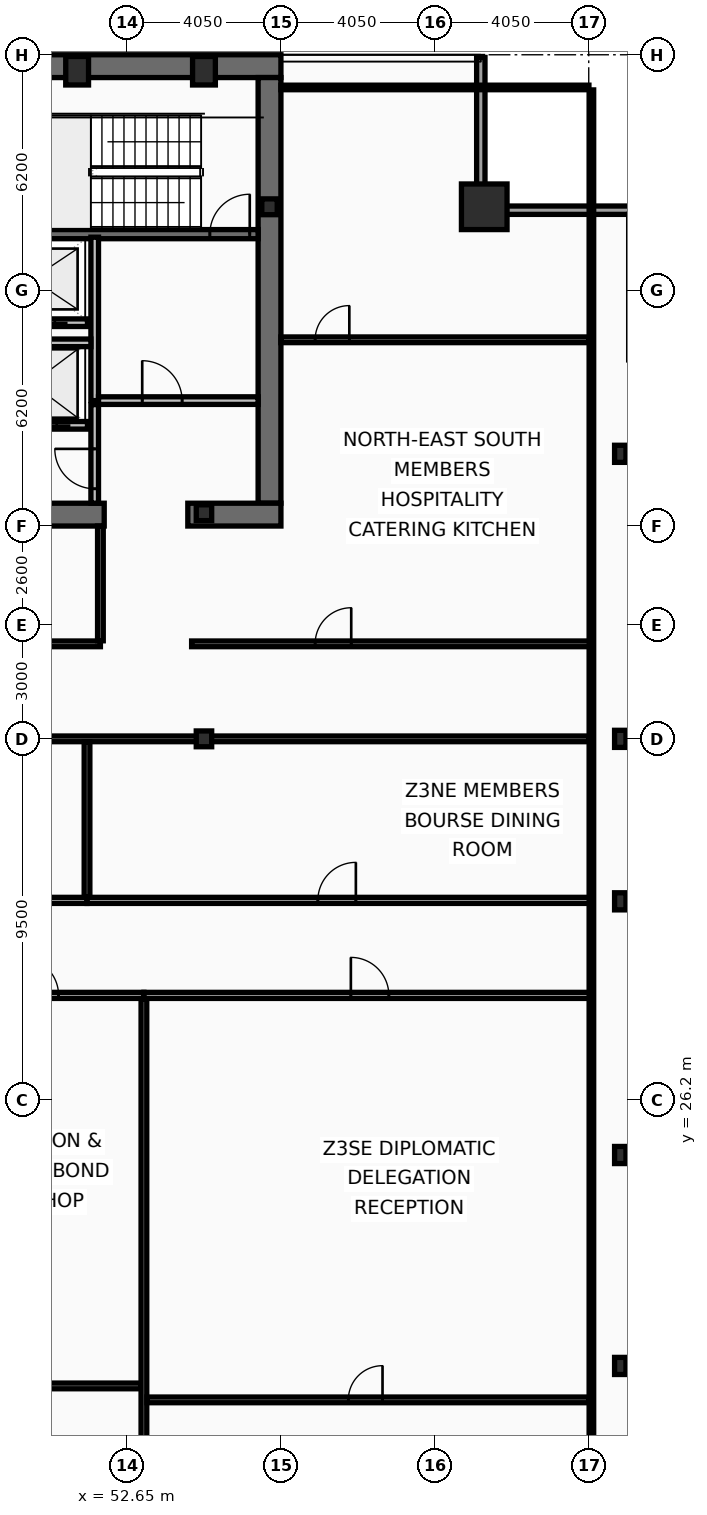
"""IFC4 building model, lengths in metres.
Left out: names, types, materials, properties, quantities, classifications, styles, units other than length and angle.
Written with IfcOpenShell. Run it as: python <this file> out.ifc"""

import sys

from ifc_helpers import new_model, si_unit, direction, frame, frame_2d, origin, origin_2d, place, context, subcontext, project, spatial, rectangle, hollow_rectangle, i_section, extrude, element, fill, save


model = new_model("IFC4")
c1 = context("Model", 3, precision=1e-05, world=origin(), true_north=direction((0.0, 1.0)))
c2 = subcontext(c1, "Body", "Model", "MODEL_VIEW")
j1 = project(units=[si_unit("LENGTHUNIT", "METRE"), si_unit("PLANEANGLEUNIT", "RADIAN")], contexts=[c1])
p1 = place(None, origin())
s1 = spatial("IfcSite", under=j1, at=p1, CompositionType="ELEMENT")
p2 = place(p1, origin())
s2 = spatial("IfcBuilding", under=s1, at=p2, CompositionType="ELEMENT")
p3 = place(p2, frame((0.0, 0.0, 217.4)))
s3 = spatial("IfcBuildingStorey", under=s2, at=p3, CompositionType="ELEMENT", Elevation=217.4)
p4 = place(p3, frame((16.2, 53.4, 0.0), z_axis=(0.0, 0.0, 1.0), x_axis=(1.0, 0.0, 0.0)))
e1 = element("IfcWall", 1, at=p4, inside=s3, PredefinedType="SHEAR", context=c2, shape_type="SweptSolid", body=[
    extrude(rectangle(XDim=40.5, YDim=0.6, at=frame_2d((20.25, 0.0))), origin(), (0.0, 0.0, 1.0), 3.44),
])
p5 = place(p3, frame((56.4, 53.1, 0.0), z_axis=(0.0, 0.0, 1.0), x_axis=(0.0, -1.0, 0.0)))
e2 = element("IfcWall", 2, at=p5, inside=s3, PredefinedType="SHEAR", context=c2, shape_type="SweptSolid", body=[
    extrude(rectangle(XDim=11.2, YDim=0.6, at=frame_2d((5.6, 0.0))), origin(), (0.0, 0.0, 1.0), 3.44),
])
p6 = place(p3, frame((52.05, 41.6, 0.0), z_axis=(0.0, 0.0, 1.0), x_axis=(-1.0, 0.0, 0.0)))
e3 = element("IfcWall", 3, at=p6, inside=s3, PredefinedType="SHEAR", context=c2, shape_type="SweptSolid", body=[
    extrude(rectangle(XDim=11.3, YDim=0.6, at=frame_2d((5.65, 0.0))), origin(), (0.0, 0.0, 1.0), 3.44),
])
p7 = place(p3, frame((56.7, 41.6, 0.0), z_axis=(0.0, 0.0, 1.0), x_axis=(-1.0, 0.0, 0.0)))
e4 = element("IfcWall", 4, at=p7, inside=s3, PredefinedType="SHEAR", context=c2, shape_type="SweptSolid", body=[
    extrude(rectangle(XDim=2.45, YDim=0.6, at=frame_2d((1.225, 0.0))), origin(), (0.0, 0.0, 1.0), 3.44),
])
p8 = place(p3, frame((48.63, 48.98, 0.0), z_axis=(0.0, 0.0, 1.0), x_axis=(1.0, 0.0, 0.0)))
e5 = element("IfcWall", 5, at=p8, inside=s3, PredefinedType="SHEAR", context=c2, shape_type="SweptSolid", body=[
    extrude(rectangle(XDim=7.47, YDim=0.24, at=frame_2d((3.735, 0.0))), origin(), (0.0, 0.0, 1.0), 3.44),
])
p9 = place(p8, frame((6.2, 0.0, 0.0)))
e6 = element("IfcOpeningElement", 6, at=p9, cuts=e5, PredefinedType="OPENING", context=c2, shape_type="SweptSolid", body=[
    extrude(rectangle(XDim=1.05, YDim=2.15, at=frame_2d((0.525, 1.075))), frame((0.0, 0.13, 0.0), z_axis=(0.0, -1.0, 0.0), x_axis=(1.0, 0.0, 0.0)), (0.0, 0.0, 1.0), 0.26),
])
p10 = place(p3, frame((62.05, 49.7, 0.0), z_axis=(0.0, 0.0, 1.0), x_axis=(1.0, 0.0, 0.0)))
e7 = element("IfcColumn", 7, at=p10, inside=s3, PredefinedType="COLUMN", context=c2, shape_type="SweptSolid", body=[
    extrude(hollow_rectangle(XDim=1.2, YDim=1.2, WallThickness=0.06, at=origin_2d()), origin(), (0.0, 0.0, 1.0), 3.6),
])
for number, where, z_axis, x_axis in (
    (8, (51.337, 53.28, 0.0), (0.0, 0.0, 1.0), (1.0, 0.0, 0.0)),
    (9, (54.675, 53.28, 0.0), (0.0, 0.0, 1.0), (1.0, 0.0, 0.0)),
):
    element("IfcColumn", number, at=place(p3, frame(where, z_axis=z_axis, x_axis=x_axis)), inside=s3, PredefinedType="COLUMN", context=c2, shape_type="SweptSolid", body=[
        extrude(hollow_rectangle(XDim=0.6, YDim=0.75, WallThickness=0.045, at=origin_2d()), origin(), (0.0, 0.0, 1.0), 3.6),
    ])
for number, where, z_axis, x_axis in (
    (10, (65.63, 19.2, 0.0), (0.0, 0.0, 1.0), (1.0, 0.0, 0.0)),
    (11, (65.63, 24.75, 0.0), (0.0, 0.0, 1.0), (1.0, 0.0, 0.0)),
    (12, (65.63, 31.425, 0.0), (0.0, 0.0, 1.0), (1.0, 0.0, 0.0)),
    (13, (65.63, 35.7, 0.0), (0.0, 0.0, 1.0), (1.0, 0.0, 0.0)),
    (14, (65.63, 43.2, 0.0), (0.0, 0.0, 1.0), (1.0, 0.0, 0.0)),
):
    element("IfcColumn", number, at=place(p3, frame(where, z_axis=z_axis, x_axis=x_axis)), inside=s3, PredefinedType="COLUMN", context=c2, shape_type="SweptSolid", body=[
        extrude(i_section(OverallWidth=0.3, OverallDepth=0.45, WebThickness=0.014, FlangeThickness=0.026, at=origin_2d()), origin(), (0.0, 0.0, 1.0), 3.6),
    ])
for number, where, z_axis, x_axis in (
    (15, (56.4, 49.7, 0.0), (0.0, 0.0, 1.0), (1.0, 0.0, 0.0)),
    (16, (54.675, 35.7, 0.0), (0.0, 0.0, 1.0), (1.0, 0.0, 0.0)),
    (17, (54.675, 41.65, 0.0), (0.0, 0.0, 1.0), (1.0, 0.0, 0.0)),
):
    element("IfcColumn", number, at=place(p3, frame(where, z_axis=z_axis, x_axis=x_axis)), inside=s3, PredefinedType="COLUMN", context=c2, shape_type="SweptSolid", body=[
        extrude(i_section(OverallWidth=0.406, OverallDepth=0.416, WebThickness=0.03, FlangeThickness=0.048, at=origin_2d()), origin(), (0.0, 0.0, 1.0), 3.6),
    ])
p11 = place(p3, frame((61.96, 53.63, 0.0), z_axis=(0.0, 0.0, 1.0), x_axis=(0.0, -1.0, 0.0)))
e18 = element("IfcWall", 18, at=p11, inside=s3, PredefinedType="SOLIDWALL", context=c2, shape_type="SweptSolid", body=[
    extrude(rectangle(XDim=3.91, YDim=0.22, at=frame_2d((1.955, 0.0))), origin(), (0.0, 0.0, 1.0), 2.83),
])
p12 = place(p3, frame((61.85, 49.61, 0.0), z_axis=(0.0, 0.0, 1.0), x_axis=(1.0, 0.0, 0.0)))
e19 = element("IfcWall", 19, at=p12, inside=s3, PredefinedType="SOLIDWALL", context=c2, shape_type="SweptSolid", body=[
    extrude(rectangle(XDim=4.22, YDim=0.22, at=frame_2d((2.11, 0.0))), origin(), (0.0, 0.0, 1.0), 2.83),
])
p13 = place(p3, frame((51.61, 43.95, 0.0), z_axis=(0.0, 0.0, 1.0), x_axis=(-1.0, 0.0, 0.0)))
e20 = element("IfcWall", 20, at=p13, inside=s3, PredefinedType="PARTITIONING", context=c2, shape_type="SweptSolid", body=[
    extrude(rectangle(XDim=2.92, YDim=0.2, at=frame_2d((1.46, 0.0))), origin(), (0.0, 0.0, 1.0), 3.44),
])
p14 = place(p13, frame((0.81, 0.0, 0.0)))
e21 = element("IfcOpeningElement", 21, at=p14, cuts=e20, PredefinedType="OPENING", context=c2, shape_type="SweptSolid", body=[
    extrude(rectangle(XDim=1.3, YDim=2.18, at=frame_2d((0.65, 1.09))), frame((0.0, 0.11, 0.0), z_axis=(0.0, -1.0, 0.0), x_axis=(1.0, 0.0, 0.0)), (0.0, 0.0, 1.0), 0.22),
])
p15 = place(p3, frame((51.61, 46.65, 0.0), z_axis=(0.0, 0.0, 1.0), x_axis=(-1.0, 0.0, 0.0)))
e22 = element("IfcWall", 22, at=p15, inside=s3, PredefinedType="PARTITIONING", context=c2, shape_type="SweptSolid", body=[
    extrude(rectangle(XDim=2.92, YDim=0.2, at=frame_2d((1.46, 0.0))), origin(), (0.0, 0.0, 1.0), 3.44),
])
p16 = place(p15, frame((0.86, 0.0, 0.0)))
e23 = element("IfcOpeningElement", 23, at=p16, cuts=e22, PredefinedType="OPENING", context=c2, shape_type="SweptSolid", body=[
    extrude(rectangle(XDim=1.2, YDim=2.18, at=frame_2d((0.6, 1.09))), frame((0.0, 0.11, 0.0), z_axis=(0.0, -1.0, 0.0), x_axis=(1.0, 0.0, 0.0)), (0.0, 0.0, 1.0), 0.22),
])
p17 = place(p3, frame((51.8, 44.6, 0.0), z_axis=(0.0, 0.0, 1.0), x_axis=(0.0, 1.0, 0.0)))
e24 = element("IfcWall", 24, at=p17, inside=s3, PredefinedType="PARTITIONING", context=c2, shape_type="SweptSolid", body=[
    extrude(rectangle(XDim=4.3, YDim=0.2, at=frame_2d((2.15, 0.0))), origin(), (0.0, 0.0, 1.0), 3.44),
])
p18 = place(p3, frame((51.9, 44.6, 0.0), z_axis=(0.0, 0.0, 1.0), x_axis=(1.0, 0.0, 0.0)))
e25 = element("IfcWall", 25, at=p18, inside=s3, PredefinedType="PARTITIONING", context=c2, shape_type="SweptSolid", body=[
    extrude(rectangle(XDim=4.2, YDim=0.2, at=frame_2d((2.1, 0.0))), origin(), (0.0, 0.0, 1.0), 3.44),
])
p19 = place(p18, frame((1.15, 0.0, 0.0)))
e26 = element("IfcOpeningElement", 26, at=p19, cuts=e25, PredefinedType="OPENING", context=c2, shape_type="SweptSolid", body=[
    extrude(rectangle(XDim=1.05, YDim=2.15, at=frame_2d((0.525, 1.075))), frame((0.0, 0.11, 0.0), z_axis=(0.0, -1.0, 0.0), x_axis=(1.0, 0.0, 0.0)), (0.0, 0.0, 1.0), 0.22),
])
p20 = place(p3, frame((48.63, 46.12, 0.0), z_axis=(0.0, 0.0, 1.0), x_axis=(1.0, 0.0, 0.0)))
e27 = element("IfcWall", 27, at=p20, inside=s3, PredefinedType="PARTITIONING", context=c2, shape_type="SweptSolid", body=[
    extrude(rectangle(XDim=3.07, YDim=0.2, at=frame_2d((1.535, 0.0))), origin(), (0.0, 0.0, 1.0), 3.44),
])
p21 = place(p3, frame((51.8, 41.9, 0.0), z_axis=(0.0, 0.0, 1.0), x_axis=(0.0, 1.0, 0.0)))
e28 = element("IfcWall", 28, at=p21, inside=s3, PredefinedType="PARTITIONING", context=c2, shape_type="SweptSolid", body=[
    extrude(rectangle(XDim=2.595, YDim=0.2, at=frame_2d((1.298, 0.0))), origin(), (0.0, 0.0, 1.0), 3.44),
])
p22 = place(p21, frame((0.38, 0.0, 0.0)))
e29 = element("IfcOpeningElement", 29, at=p22, cuts=e28, PredefinedType="OPENING", context=c2, shape_type="SweptSolid", body=[
    extrude(rectangle(XDim=1.05, YDim=2.15, at=frame_2d((0.525, 1.075))), frame((0.0, 0.11, 0.0), z_axis=(0.0, -1.0, 0.0), x_axis=(1.0, 0.0, 0.0)), (0.0, 0.0, 1.0), 0.22),
])
p23 = place(p3, frame((47.05, 38.2, 0.0), z_axis=(0.0, 0.0, 1.0), x_axis=(1.0, 0.0, 0.0)))
e30 = element("IfcWall", 30, at=p23, inside=s3, PredefinedType="PARTITIONING", context=c2, shape_type="SweptSolid", body=[
    extrude(rectangle(XDim=4.9, YDim=0.15, at=frame_2d((2.45, 0.0))), origin(), (0.0, 0.0, 1.0), 2.78),
])
p24 = place(p23, frame((1.1, 0.0, 0.0)))
e31 = element("IfcOpeningElement", 31, at=p24, cuts=e30, PredefinedType="OPENING", context=c2, shape_type="SweptSolid", body=[
    extrude(rectangle(XDim=1.0, YDim=2.05, at=frame_2d((0.5, 1.025))), frame((0.0, 0.085, 0.0), z_axis=(0.0, -1.0, 0.0), x_axis=(1.0, 0.0, 0.0)), (0.0, 0.0, 1.0), 0.17),
])
p25 = place(p3, frame((51.95, 38.28, 0.0), z_axis=(0.0, 0.0, 1.0), x_axis=(0.0, 1.0, 0.0)))
e32 = element("IfcWall", 32, at=p25, inside=s3, PredefinedType="PARTITIONING", context=c2, shape_type="SweptSolid", body=[
    extrude(rectangle(XDim=3.02, YDim=0.15, at=frame_2d((1.51, 0.0))), origin(), (0.0, 0.0, 1.0), 3.44),
])
p26 = place(p3, frame((54.35, 38.2, 0.0), z_axis=(0.0, 0.0, 1.0), x_axis=(1.0, 0.0, 0.0)))
e33 = element("IfcWall", 33, at=p26, inside=s3, PredefinedType="PARTITIONING", context=c2, shape_type="SweptSolid", body=[
    extrude(rectangle(XDim=10.52, YDim=0.15, at=frame_2d((5.26, 0.0))), origin(), (0.0, 0.0, 1.0), 2.78),
])
p27 = place(p26, frame((3.25, 0.0, 0.0)))
e34 = element("IfcOpeningElement", 34, at=p27, cuts=e33, PredefinedType="OPENING", context=c2, shape_type="SweptSolid", body=[
    extrude(rectangle(XDim=0.95, YDim=2.05, at=frame_2d((0.475, 1.025))), frame((0.0, 0.085, 0.0), z_axis=(0.0, -1.0, 0.0), x_axis=(1.0, 0.0, 0.0)), (0.0, 0.0, 1.0), 0.17),
])
p28 = place(p3, frame((56.7, 46.2, 0.0), z_axis=(0.0, 0.0, 1.0), x_axis=(1.0, 0.0, 0.0)))
e35 = element("IfcWall", 35, at=p28, inside=s3, PredefinedType="PARTITIONING", context=c2, shape_type="SweptSolid", body=[
    extrude(rectangle(XDim=8.105, YDim=0.15, at=frame_2d((4.052, 0.0))), origin(), (0.0, 0.0, 1.0), 2.83),
])
p29 = place(p28, frame((0.9, 0.0, 0.0)))
e36 = element("IfcOpeningElement", 36, at=p29, cuts=e35, PredefinedType="OPENING", context=c2, shape_type="SweptSolid", body=[
    extrude(rectangle(XDim=0.9, YDim=2.05, at=frame_2d((0.45, 1.025))), frame((0.0, 0.085, 0.0), z_axis=(0.0, -1.0, 0.0), x_axis=(1.0, 0.0, 0.0)), (0.0, 0.0, 1.0), 0.17),
])
p30 = place(p3, frame((39.88, 35.7, 0.0), z_axis=(0.0, 0.0, 1.0), x_axis=(1.0, 0.0, 0.0)))
e37 = element("IfcWall", 37, at=p30, inside=s3, PredefinedType="PARTITIONING", context=c2, shape_type="SweptSolid", body=[
    extrude(rectangle(XDim=24.925, YDim=0.15, at=frame_2d((12.462, 0.0))), origin(), (0.0, 0.0, 1.0), 2.78),
])
p31 = place(p3, frame((46.637, 28.95, 0.0), z_axis=(0.0, 0.0, 1.0), x_axis=(1.0, 0.0, 0.0)))
e38 = element("IfcWall", 38, at=p31, inside=s3, PredefinedType="PARTITIONING", context=c2, shape_type="SweptSolid", body=[
    extrude(rectangle(XDim=6.458, YDim=0.16, at=frame_2d((3.229, 0.0))), origin(), (0.0, 0.0, 1.0), 2.78),
])
p32 = place(p31, frame((3.212, 0.0, 0.0)))
e39 = element("IfcOpeningElement", 39, at=p32, cuts=e38, PredefinedType="OPENING", context=c2, shape_type="SweptSolid", body=[
    extrude(rectangle(XDim=1.0, YDim=2.05, at=frame_2d((0.5, 1.025))), frame((0.0, 0.09, 0.0), z_axis=(0.0, -1.0, 0.0), x_axis=(1.0, 0.0, 0.0)), (0.0, 0.0, 1.0), 0.18),
])
p33 = place(p3, frame((46.717, 18.674, 0.0), z_axis=(0.0, 0.0, 1.0), x_axis=(1.0, 0.0, 0.0)))
e40 = element("IfcWall", 40, at=p33, inside=s3, PredefinedType="PARTITIONING", context=c2, shape_type="SweptSolid", body=[
    extrude(rectangle(XDim=6.297, YDim=0.15, at=frame_2d((3.149, 0.0))), origin(), (0.0, 0.0, 1.0), 2.78),
])
p34 = place(p33, frame((2.906, 0.0, 0.0)))
e41 = element("IfcOpeningElement", 41, at=p34, cuts=e40, PredefinedType="OPENING", context=c2, shape_type="SweptSolid", body=[
    extrude(rectangle(XDim=0.9, YDim=2.05, at=frame_2d((0.45, 1.025))), frame((0.0, 0.085, 0.0), z_axis=(0.0, -1.0, 0.0), x_axis=(1.0, 0.0, 0.0)), (0.0, 0.0, 1.0), 0.17),
])
p35 = place(p3, frame((53.095, 28.95, 0.0), z_axis=(0.0, 0.0, 1.0), x_axis=(1.0, 0.0, 0.0)))
e42 = element("IfcWall", 42, at=p35, inside=s3, PredefinedType="PARTITIONING", context=c2, shape_type="SweptSolid", body=[
    extrude(rectangle(XDim=11.775, YDim=0.16, at=frame_2d((5.888, 0.0))), origin(), (0.0, 0.0, 1.0), 2.78),
])
p36 = place(p35, frame((5.446, 0.0, 0.0)))
e43 = element("IfcOpeningElement", 43, at=p36, cuts=e42, PredefinedType="OPENING", context=c2, shape_type="SweptSolid", body=[
    extrude(rectangle(XDim=1.0, YDim=2.05, at=frame_2d((0.5, 1.025))), frame((0.0, 0.09, 0.0), z_axis=(0.0, -1.0, 0.0), x_axis=(1.0, 0.0, 0.0)), (0.0, 0.0, 1.0), 0.18),
])
p37 = place(p3, frame((53.095, 10.665, 0.0), z_axis=(0.0, 0.0, 1.0), x_axis=(0.0, 1.0, 0.0)))
e44 = element("IfcWall", 44, at=p37, inside=s3, PredefinedType="PARTITIONING", context=c2, shape_type="SweptSolid", body=[
    extrude(rectangle(XDim=18.2, YDim=0.15, at=frame_2d((9.1, 0.0))), origin(), (0.0, 0.0, 1.0), 2.98),
])
p38 = place(p3, frame((53.175, 18.307, 0.0), z_axis=(0.0, 0.0, 1.0), x_axis=(1.0, 0.0, 0.0)))
e45 = element("IfcWall", 45, at=p38, inside=s3, PredefinedType="PARTITIONING", context=c2, shape_type="SweptSolid", body=[
    extrude(rectangle(XDim=11.63, YDim=0.15, at=frame_2d((5.815, 0.0))), origin(), (0.0, 0.0, 1.0), 2.78),
])
p39 = place(p38, frame((5.299, 0.0, 0.0)))
e46 = element("IfcOpeningElement", 46, at=p39, cuts=e45, PredefinedType="OPENING", context=c2, shape_type="SweptSolid", body=[
    extrude(rectangle(XDim=0.9, YDim=2.05, at=frame_2d((0.45, 1.025))), frame((0.0, 0.085, 0.0), z_axis=(0.0, -1.0, 0.0), x_axis=(1.0, 0.0, 0.0)), (0.0, 0.0, 1.0), 0.17),
])
p40 = place(p3, frame((39.8, 31.45, 0.0), z_axis=(0.0, 0.0, 1.0), x_axis=(1.0, 0.0, 0.0)))
e47 = element("IfcWall", 47, at=p40, inside=s3, PredefinedType="PARTITIONING", context=c2, shape_type="SweptSolid", body=[
    extrude(rectangle(XDim=11.798, YDim=0.16, at=frame_2d((5.899, 0.0))), origin(), (0.0, 0.0, 1.0), 2.78),
])
p41 = place(p40, frame((5.455, 0.0, 0.0)))
e48 = element("IfcOpeningElement", 48, at=p41, cuts=e47, PredefinedType="OPENING", context=c2, shape_type="SweptSolid", body=[
    extrude(rectangle(XDim=1.0, YDim=2.05, at=frame_2d((0.5, 1.025))), frame((0.0, 0.09, 0.0), z_axis=(0.0, -1.0, 0.0), x_axis=(1.0, 0.0, 0.0)), (0.0, 0.0, 1.0), 0.18),
])
p42 = place(p3, frame((51.598, 31.45, 0.0), z_axis=(0.0, 0.0, 1.0), x_axis=(1.0, 0.0, 0.0)))
e49 = element("IfcWall", 49, at=p42, inside=s3, PredefinedType="PARTITIONING", context=c2, shape_type="SweptSolid", body=[
    extrude(rectangle(XDim=13.272, YDim=0.16, at=frame_2d((6.636, 0.0))), origin(), (0.0, 0.0, 1.0), 2.78),
])
p43 = place(p42, frame((6.074, 0.0, 0.0)))
e50 = element("IfcOpeningElement", 50, at=p43, cuts=e49, PredefinedType="OPENING", context=c2, shape_type="SweptSolid", body=[
    extrude(rectangle(XDim=1.0, YDim=2.05, at=frame_2d((0.5, 1.025))), frame((0.0, 0.09, 0.0), z_axis=(0.0, -1.0, 0.0), x_axis=(1.0, 0.0, 0.0)), (0.0, 0.0, 1.0), 0.18),
])
p44 = place(p3, frame((51.598, 31.535, 0.0), z_axis=(0.0, 0.0, 1.0), x_axis=(0.0, 1.0, 0.0)))
e51 = element("IfcWall", 51, at=p44, inside=s3, PredefinedType="PARTITIONING", context=c2, shape_type="SweptSolid", body=[
    extrude(rectangle(XDim=4.085, YDim=0.15, at=frame_2d((2.042, 0.0))), origin(), (0.0, 0.0, 1.0), 2.98),
])
p45 = place(p3, frame((64.87, 10.665, 0.0), z_axis=(0.0, 0.0, 1.0), x_axis=(0.0, 1.0, 0.0)))
e52 = element("IfcWall", 52, at=p45, inside=s3, PredefinedType="PARTITIONING", context=c2, shape_type="SweptSolid", body=[
    extrude(rectangle(XDim=42.11, YDim=0.12, at=frame_2d((21.055, 0.0))), origin(), (0.0, 0.0, 1.0), 2.78),
])
p46 = place(p3, frame((56.7, 52.84, 0.0), z_axis=(0.0, 0.0, 1.0), x_axis=(1.0, 0.0, 0.0)))
e53 = element("IfcWall", 53, at=p46, inside=s3, PredefinedType="PARTITIONING", context=c2, shape_type="SweptSolid", body=[
    extrude(rectangle(XDim=8.105, YDim=0.12, at=frame_2d((4.052, 0.0))), origin(), (0.0, 0.0, 1.0), 3.44),
])
p47 = place(p9, origin())
e54 = element("IfcDoor", 54, at=p47, inside=s3, OperationType="SINGLE_SWING_RIGHT", PredefinedType="DOOR", context=c2, shape_type="SweptSolid", body=[
    extrude(rectangle(XDim=1.05, YDim=2.15, at=frame_2d((0.525, 1.075))), frame((0.0, 0.025, 0.0), z_axis=(0.0, -1.0, 0.0), x_axis=(1.0, 0.0, 0.0)), (0.0, 0.0, 1.0), 0.05),
])
fill(e6, e54)
p48 = place(p14, origin())
e55 = element("IfcDoor", 55, at=p48, inside=s3, OperationType="SLIDING_TO_LEFT", PredefinedType="DOOR", context=c2, shape_type="SweptSolid", body=[
    extrude(rectangle(XDim=1.3, YDim=2.18, at=frame_2d((0.65, 1.09))), frame((0.0, 0.025, 0.0), z_axis=(0.0, -1.0, 0.0), x_axis=(1.0, 0.0, 0.0)), (0.0, 0.0, 1.0), 0.05),
])
fill(e21, e55)
p49 = place(p16, origin())
e56 = element("IfcDoor", 56, at=p49, inside=s3, OperationType="SLIDING_TO_LEFT", PredefinedType="DOOR", context=c2, shape_type="SweptSolid", body=[
    extrude(rectangle(XDim=1.2, YDim=2.18, at=frame_2d((0.6, 1.09))), frame((0.0, 0.025, 0.0), z_axis=(0.0, -1.0, 0.0), x_axis=(1.0, 0.0, 0.0)), (0.0, 0.0, 1.0), 0.05),
])
fill(e23, e56)
p50 = place(p19, origin())
e57 = element("IfcDoor", 57, at=p50, inside=s3, OperationType="SINGLE_SWING_LEFT", PredefinedType="DOOR", context=c2, shape_type="SweptSolid", body=[
    extrude(rectangle(XDim=1.05, YDim=2.15, at=frame_2d((0.525, 1.075))), frame((0.0, 0.025, 0.0), z_axis=(0.0, -1.0, 0.0), x_axis=(1.0, 0.0, 0.0)), (0.0, 0.0, 1.0), 0.05),
])
fill(e26, e57)
p51 = place(p22, origin())
e58 = element("IfcDoor", 58, at=p51, inside=s3, OperationType="SINGLE_SWING_RIGHT", PredefinedType="DOOR", context=c2, shape_type="SweptSolid", body=[
    extrude(rectangle(XDim=1.05, YDim=2.15, at=frame_2d((0.525, 1.075))), frame((0.0, 0.025, 0.0), z_axis=(0.0, -1.0, 0.0), x_axis=(1.0, 0.0, 0.0)), (0.0, 0.0, 1.0), 0.05),
])
fill(e29, e58)
p52 = place(p27, origin())
e59 = element("IfcDoor", 59, at=p52, inside=s3, OperationType="SINGLE_SWING_RIGHT", PredefinedType="DOOR", context=c2, shape_type="SweptSolid", body=[
    extrude(rectangle(XDim=0.95, YDim=2.05, at=frame_2d((0.475, 1.025))), frame((0.0, 0.025, 0.0), z_axis=(0.0, -1.0, 0.0), x_axis=(1.0, 0.0, 0.0)), (0.0, 0.0, 1.0), 0.05),
])
fill(e34, e59)
p53 = place(p29, origin())
e60 = element("IfcDoor", 60, at=p53, inside=s3, OperationType="SINGLE_SWING_RIGHT", PredefinedType="DOOR", context=c2, shape_type="SweptSolid", body=[
    extrude(rectangle(XDim=0.9, YDim=2.05, at=frame_2d((0.45, 1.025))), frame((0.0, 0.025, 0.0), z_axis=(0.0, -1.0, 0.0), x_axis=(1.0, 0.0, 0.0)), (0.0, 0.0, 1.0), 0.05),
])
fill(e36, e60)
p54 = place(p32, origin())
e61 = element("IfcDoor", 61, at=p54, inside=s3, OperationType="SINGLE_SWING_LEFT", PredefinedType="DOOR", context=c2, shape_type="SweptSolid", body=[
    extrude(rectangle(XDim=1.0, YDim=2.05, at=frame_2d((0.5, 1.025))), frame((0.0, 0.025, 0.0), z_axis=(0.0, -1.0, 0.0), x_axis=(1.0, 0.0, 0.0)), (0.0, 0.0, 1.0), 0.05),
])
fill(e39, e61)
p55 = place(p36, origin())
e62 = element("IfcDoor", 62, at=p55, inside=s3, OperationType="SINGLE_SWING_LEFT", PredefinedType="DOOR", context=c2, shape_type="SweptSolid", body=[
    extrude(rectangle(XDim=1.0, YDim=2.05, at=frame_2d((0.5, 1.025))), frame((0.0, 0.025, 0.0), z_axis=(0.0, -1.0, 0.0), x_axis=(1.0, 0.0, 0.0)), (0.0, 0.0, 1.0), 0.05),
])
fill(e43, e62)
p56 = place(p39, origin())
e63 = element("IfcDoor", 63, at=p56, inside=s3, OperationType="SINGLE_SWING_RIGHT", PredefinedType="DOOR", context=c2, shape_type="SweptSolid", body=[
    extrude(rectangle(XDim=0.9, YDim=2.05, at=frame_2d((0.45, 1.025))), frame((0.0, 0.025, 0.0), z_axis=(0.0, -1.0, 0.0), x_axis=(1.0, 0.0, 0.0)), (0.0, 0.0, 1.0), 0.05),
])
fill(e46, e63)
p57 = place(p43, origin())
e64 = element("IfcDoor", 64, at=p57, inside=s3, OperationType="SINGLE_SWING_RIGHT", PredefinedType="DOOR", context=c2, shape_type="SweptSolid", body=[
    extrude(rectangle(XDim=1.0, YDim=2.05, at=frame_2d((0.5, 1.025))), frame((0.0, 0.025, 0.0), z_axis=(0.0, -1.0, 0.0), x_axis=(1.0, 0.0, 0.0)), (0.0, 0.0, 1.0), 0.05),
])
fill(e50, e64)
save(model, sys.argv[1])
